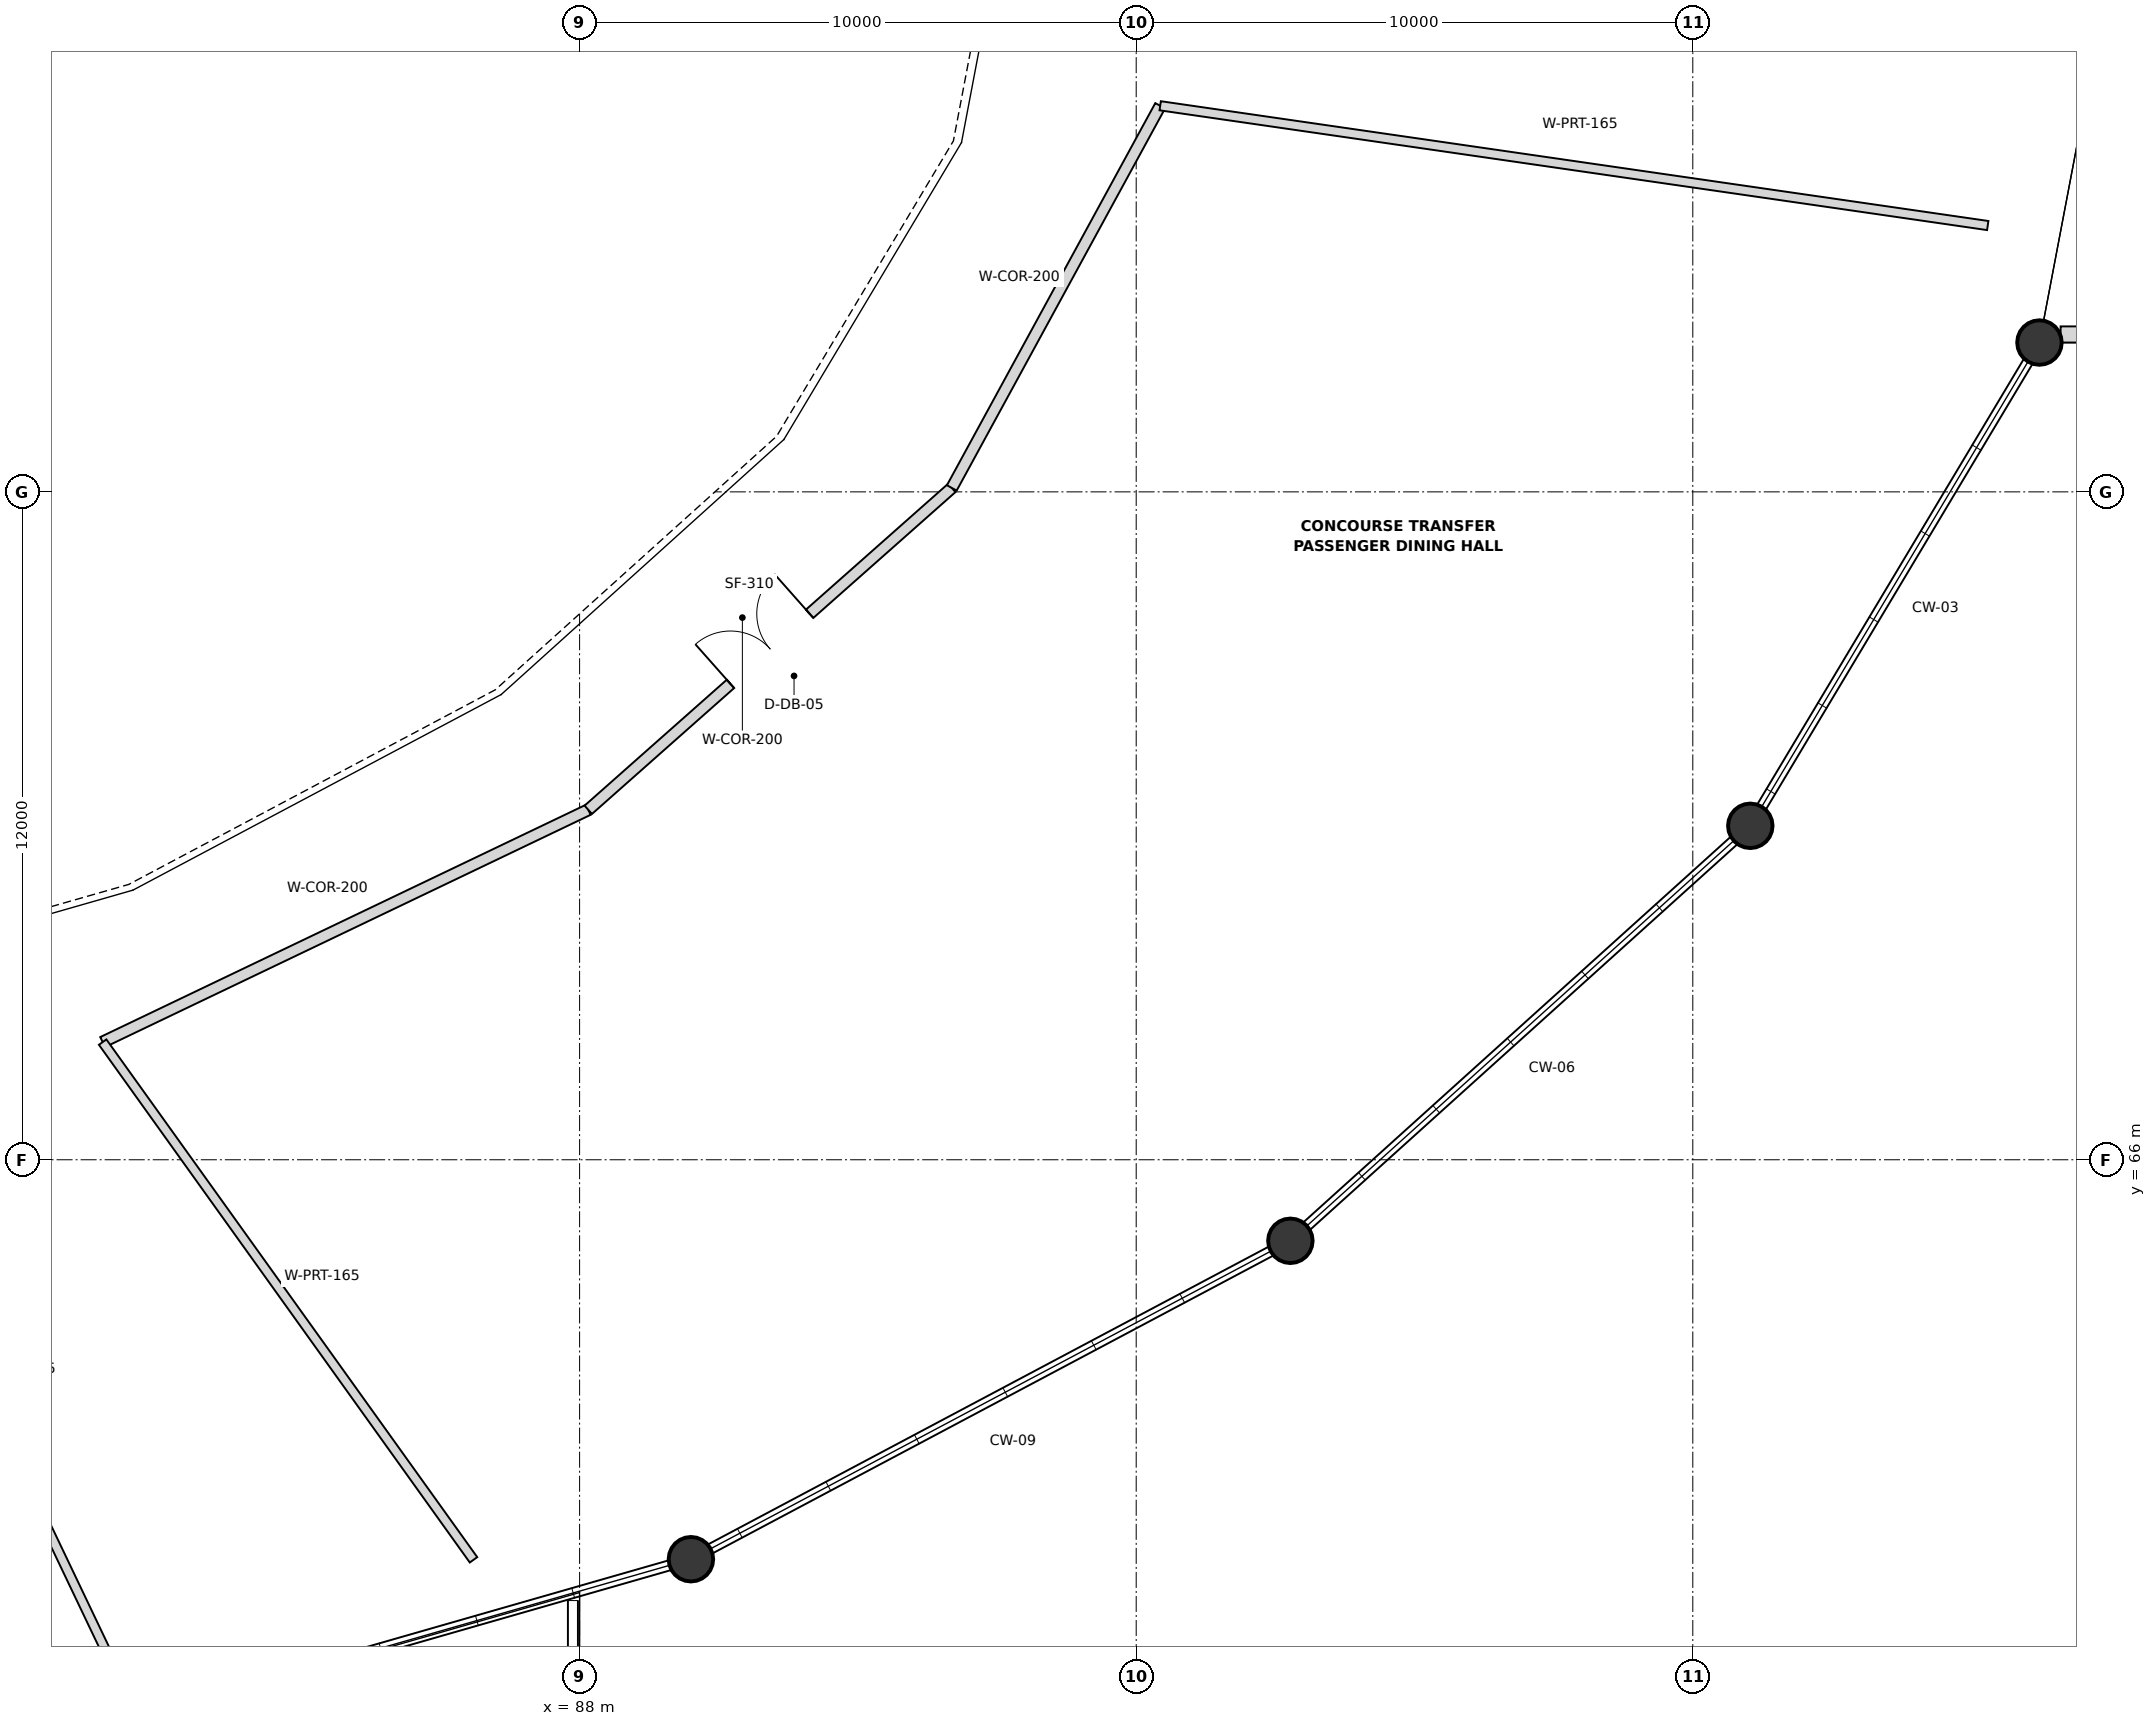
"""IFC4 building model, lengths in metres.
Left out: names, types, materials, properties, quantities, classifications, styles, units other than length and angle.
Written with IfcOpenShell. Run it as: python <this file> out.ifc"""

import sys

from ifc_helpers import new_model, si_unit, direction, frame, frame_2d, origin, origin_2d, place, context, subcontext, project, spatial, rectangle, circle, extrude, element, fill, save


model = new_model("IFC4")
c1 = context("Model", 3, precision=1e-05, world=origin(), true_north=direction((0.0, 1.0)))
c2 = subcontext(c1, "Body", "Model", "MODEL_VIEW")
j1 = project(units=[si_unit("LENGTHUNIT", "METRE"), si_unit("PLANEANGLEUNIT", "RADIAN")], contexts=[c1])
p1 = place(None, origin())
s1 = spatial("IfcSite", under=j1, at=p1, CompositionType="ELEMENT")
p2 = place(p1, origin())
s2 = spatial("IfcBuilding", under=s1, at=p2, CompositionType="ELEMENT")
p3 = place(p2, frame((0.0, 0.0, 9.6)))
s3 = spatial("IfcBuildingStorey", under=s2, at=p3, CompositionType="ELEMENT", Elevation=9.6)
for number, where, z_axis, x_axis in (
    (1, (90.0, 58.823, 0.0), (0.0, 0.0, 1.0), (1.0, 0.0, 0.0)),
    (2, (100.77, 64.544, 0.0), (0.0, 0.0, 1.0), (1.0, 0.0, 0.0)),
    (3, (109.033, 72.0, 0.0), (0.0, 0.0, 1.0), (1.0, 0.0, 0.0)),
    (4, (114.228, 80.683, 0.0), (0.0, 0.0, 1.0), (1.0, 0.0, 0.0)),
):
    element("IfcColumn", number, at=place(p3, frame(where, z_axis=z_axis, x_axis=x_axis)), inside=s3, PredefinedType="COLUMN", context=c2, shape_type="SweptSolid", body=[
        extrude(circle(Radius=0.4, at=origin_2d()), origin(), (0.0, 0.0, 1.0), 4.8),
    ])
p4 = place(p3, frame((117.65, 80.828, 0.0), z_axis=(0.0, 0.0, 1.0), x_axis=(-1.0, 0.0, 0.0)))
e5 = element("IfcWall", 5, at=p4, inside=s3, PredefinedType="SOLIDWALL", context=c2, shape_type="SweptSolid", body=[
    extrude(rectangle(XDim=3.042, YDim=0.29, at=frame_2d((1.521, 0.0))), origin(), (0.0, 0.0, 1.0), 4.0),
])
p5 = place(p3, frame((74.877, 66.842, 0.0), z_axis=(0.0, 0.0, 1.0), x_axis=(0.430636358526, -0.902525526905, 0.0)))
e6 = element("IfcWall", 6, at=p5, inside=s3, PredefinedType="PARTITIONING", context=c2, shape_type="SweptSolid", body=[
    extrude(rectangle(XDim=10.907, YDim=0.165, at=frame_2d((5.454, 0.0))), origin(), (0.0, 0.0, 1.0), 3.1),
])
p6 = place(p3, frame((79.431, 68.114, 0.0), z_axis=(0.0, 0.0, 1.0), x_axis=(0.902085946196, 0.431556422355, 0.0)))
e7 = element("IfcWall", 7, at=p6, inside=s3, PredefinedType="PARTITIONING", context=c2, shape_type="SweptSolid", body=[
    extrude(rectangle(XDim=9.672, YDim=0.2, at=frame_2d((4.836, 0.0))), origin(), (0.0, 0.0, 1.0), 3.1),
])
p7 = place(p3, frame((88.156, 72.288, 0.0), z_axis=(0.0, 0.0, 1.0), x_axis=(0.748681838454, 0.662929487027, 0.0)))
e8 = element("IfcWall", 8, at=p7, inside=s3, PredefinedType="PARTITIONING", context=c2, shape_type="SweptSolid", body=[
    extrude(rectangle(XDim=8.723, YDim=0.2, at=frame_2d((4.362, 0.0))), origin(), (0.0, 0.0, 1.0), 3.1),
])
p8 = place(p7, frame((3.412, 0.0, 0.0)))
e9 = element("IfcOpeningElement", 9, at=p8, cuts=e8, PredefinedType="OPENING", context=c2, shape_type="SweptSolid", body=[
    extrude(rectangle(XDim=1.9, YDim=2.25, at=frame_2d((0.95, 1.125))), frame((0.0, 0.11, 0.0), z_axis=(0.0, -1.0, 0.0), x_axis=(1.0, 0.0, 0.0)), (0.0, 0.0, 1.0), 0.22),
])
p9 = place(p3, frame((94.687, 78.071, 0.0), z_axis=(0.0, 0.0, 1.0), x_axis=(0.478736200362, 0.877958797703, 0.0)))
e10 = element("IfcWall", 10, at=p9, inside=s3, PredefinedType="PARTITIONING", context=c2, shape_type="SweptSolid", body=[
    extrude(rectangle(XDim=7.82, YDim=0.2, at=frame_2d((3.91, 0.0))), origin(), (0.0, 0.0, 1.0), 3.1),
])
p10 = place(p3, frame((79.431, 68.114, 0.0), z_axis=(0.0, 0.0, 1.0), x_axis=(0.582325565776, -0.812955678647, 0.0)))
e11 = element("IfcWall", 11, at=p10, inside=s3, PredefinedType="PARTITIONING", context=c2, shape_type="SweptSolid", body=[
    extrude(rectangle(XDim=11.442, YDim=0.165, at=frame_2d((5.721, 0.0))), origin(), (0.0, 0.0, 1.0), 3.1),
])
p11 = place(p3, frame((98.431, 84.937, 0.0), z_axis=(0.0, 0.0, 1.0), x_axis=(0.989686158289, -0.143252602386, 0.0)))
e12 = element("IfcWall", 12, at=p11, inside=s3, PredefinedType="PARTITIONING", context=c2, shape_type="SweptSolid", body=[
    extrude(rectangle(XDim=15.023, YDim=0.165, at=frame_2d((7.512, 0.0))), origin(), (0.0, 0.0, 1.0), 3.1),
])
p12 = place(p8, origin())
e13 = element("IfcDoor", 13, at=p12, inside=s3, OperationType="DOUBLE_DOOR_SINGLE_SWING", PredefinedType="DOOR", context=c2, shape_type="SweptSolid", body=[
    extrude(rectangle(XDim=1.9, YDim=2.25, at=frame_2d((0.95, 1.125))), frame((0.0, 0.025, 0.0), z_axis=(0.0, -1.0, 0.0), x_axis=(1.0, 0.0, 0.0)), (0.0, 0.0, 1.0), 0.05),
])
fill(e9, e13)
save(model, sys.argv[1])
